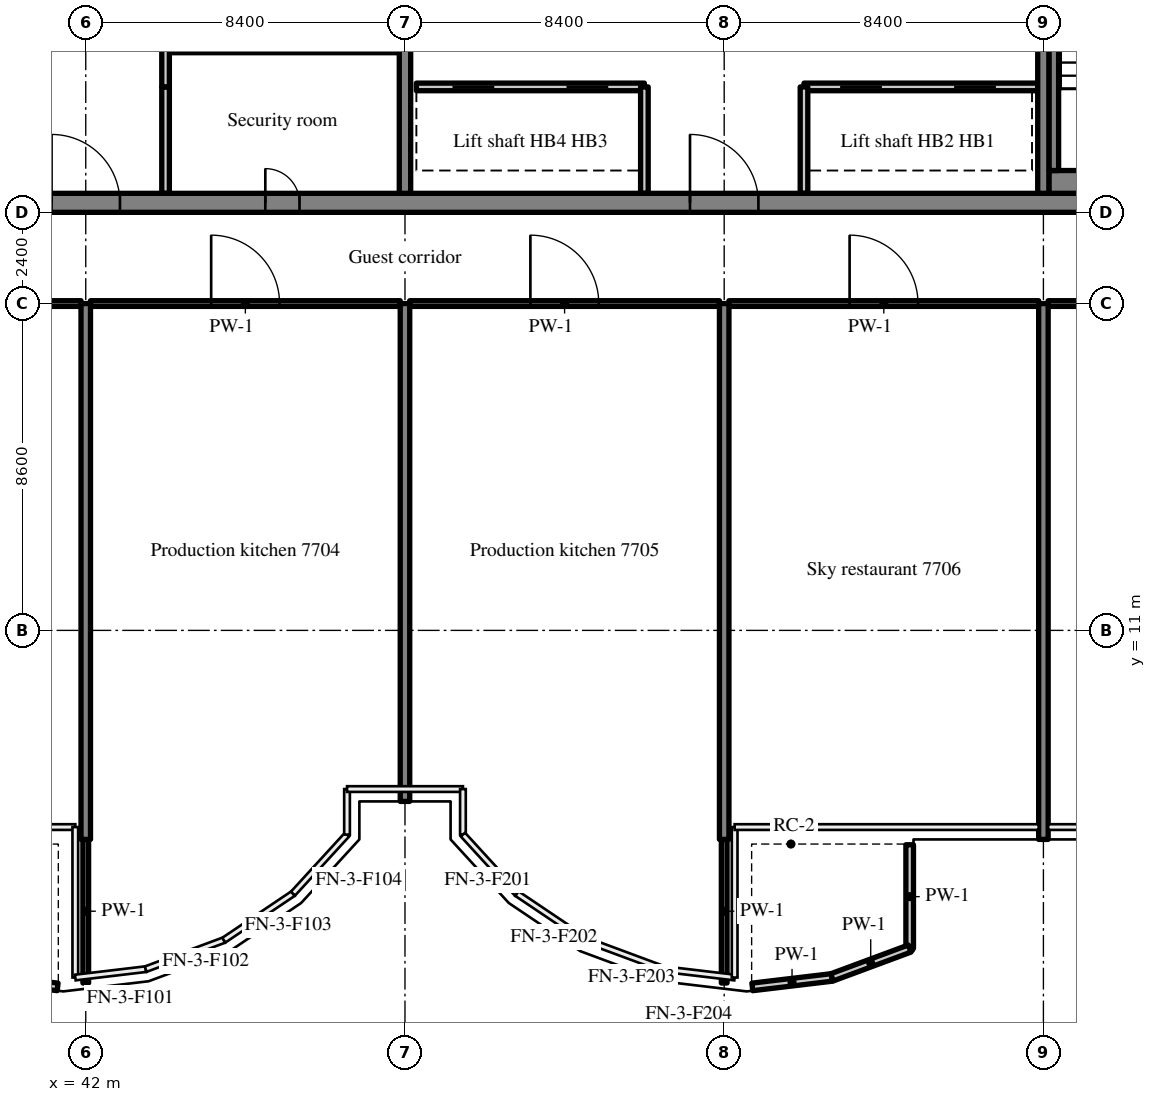
"""IFC4 building model, lengths in metres.
Left out: names, types, materials, properties, quantities, classifications, styles, units other than length and angle.
Written with IfcOpenShell. Run it as: python <this file> out.ifc"""

import sys

from ifc_helpers import new_model, si_unit, direction, frame, frame_2d, origin, place, context, subcontext, project, spatial, rectangle, extrude, source, transform, mapped, element, fill, save


model = new_model("IFC4")
c1 = context("Model", 3, precision=1e-05, world=origin(), true_north=direction((0.0, 1.0)))
c2 = subcontext(c1, "Body", "Model", "MODEL_VIEW")
j1 = project(units=[si_unit("LENGTHUNIT", "METRE"), si_unit("PLANEANGLEUNIT", "RADIAN")], contexts=[c1])
p1 = place(None, origin())
s1 = spatial("IfcSite", under=j1, at=p1, CompositionType="ELEMENT")
p2 = place(p1, origin())
s2 = spatial("IfcBuilding", under=s1, at=p2, CompositionType="ELEMENT")
p3 = place(p2, frame((0.0, 0.0, 323.7)))
s3 = spatial("IfcBuildingStorey", under=s2, at=p3, CompositionType="ELEMENT", Elevation=323.7)
m1 = source(origin(), c2, "Body", "SweptSolid", [
    extrude(rectangle(XDim=50.4, YDim=0.5, at=frame_2d((25.2, 0.0))), origin(), (0.0, 0.0, 1.0), 5.72),
])
p4 = place(p3, frame((25.2, 22.25, 0.0), z_axis=(0.0, 0.0, 1.0), x_axis=(1.0, 0.0, 0.0)))
e1 = element("IfcWall", 1, at=p4, inside=s3, PredefinedType="SHEAR", context=c2, shape_type="MappedRepresentation", body=[
    mapped(m1, transform((0.0, 0.0, 0.0), scale=1.0)),
])
m2 = source(origin(), c2, "Body", "SweptSolid", [
    extrude(rectangle(XDim=1.8, YDim=2.1, at=frame_2d((0.9, 1.05))), frame((0.0, 0.26, 0.0), z_axis=(0.0, -1.0, 0.0), x_axis=(1.0, 0.0, 0.0)), (0.0, 0.0, 1.0), 0.52),
])
p5 = place(p4, frame((15.9, 0.0, 0.0)))
e2 = element("IfcOpeningElement", 2, at=p5, cuts=e1, PredefinedType="OPENING", context=c2, shape_type="MappedRepresentation", body=[
    mapped(m2, transform((0.0, 0.0, 0.0), scale=1.0)),
])
m3 = source(origin(), c2, "Body", "SweptSolid", [
    extrude(rectangle(XDim=0.9, YDim=2.1, at=frame_2d((0.45, 1.05))), frame((0.0, 0.26, 0.0), z_axis=(0.0, -1.0, 0.0), x_axis=(1.0, 0.0, 0.0)), (0.0, 0.0, 1.0), 0.52),
])
p6 = place(p4, frame((9.675, 0.0, 0.0)))
e3 = element("IfcOpeningElement", 3, at=p6, cuts=e1, PredefinedType="OPENING", context=c2, shape_type="MappedRepresentation", body=[
    mapped(m3, transform((0.0, 0.0, 0.0), scale=1.0)),
])
p7 = place(p4, frame((21.525, 0.0, 0.0)))
e4 = element("IfcOpeningElement", 4, at=p7, cuts=e1, PredefinedType="OPENING", context=c2, shape_type="MappedRepresentation", body=[
    mapped(m3, transform((0.0, 0.0, 0.0), scale=1.0)),
])
p8 = place(p4, frame((32.7, 0.0, 0.0)))
e5 = element("IfcOpeningElement", 5, at=p8, cuts=e1, PredefinedType="OPENING", context=c2, shape_type="MappedRepresentation", body=[
    mapped(m2, transform((0.0, 0.0, 0.0), scale=1.0)),
])
m4 = source(origin(), c2, "Body", "SweptSolid", [
    extrude(rectangle(XDim=1.2, YDim=2.1, at=frame_2d((0.6, 1.05))), frame((0.0, 0.26, 0.0), z_axis=(0.0, -1.0, 0.0), x_axis=(1.0, 0.0, 0.0)), (0.0, 0.0, 1.0), 0.52),
])
p9 = place(p4, frame((6.5, 0.0, 0.0)))
e6 = element("IfcOpeningElement", 6, at=p9, cuts=e1, PredefinedType="OPENING", context=c2, shape_type="MappedRepresentation", body=[
    mapped(m4, transform((0.0, 0.0, 0.0), scale=1.0)),
])
p10 = place(p4, frame((47.975, 0.0, 0.0)))
e7 = element("IfcOpeningElement", 7, at=p10, cuts=e1, PredefinedType="OPENING", context=c2, shape_type="MappedRepresentation", body=[
    mapped(m4, transform((0.0, 0.0, 0.0), scale=1.0)),
])
m5 = source(origin(), c2, "Body", "SweptSolid", [
    extrude(rectangle(XDim=19.0, YDim=0.3, at=frame_2d((9.5, 0.0))), origin(), (0.0, 0.0, 1.0), 5.72),
])
p11 = place(p3, frame((50.4, 22.5, 0.0), z_axis=(0.0, 0.0, 1.0), x_axis=(0.0, 1.0, 0.0)))
e8 = element("IfcWall", 8, at=p11, inside=s3, PredefinedType="SHEAR", context=c2, shape_type="MappedRepresentation", body=[
    mapped(m5, transform((0.0, 0.0, 0.0), scale=1.0)),
])
m6 = source(origin(), c2, "Body", "SweptSolid", [
    extrude(rectangle(XDim=1.1, YDim=2.1, at=frame_2d((0.55, 1.05))), frame((0.0, 0.16, 0.0), z_axis=(0.0, -1.0, 0.0), x_axis=(1.0, 0.0, 0.0)), (0.0, 0.0, 1.0), 0.32),
])
p12 = place(p11, frame((12.95, 0.0, 0.0)))
e9 = element("IfcOpeningElement", 9, at=p12, cuts=e8, PredefinedType="OPENING", context=c2, shape_type="MappedRepresentation", body=[
    mapped(m6, transform((0.0, 0.0, 0.0), scale=1.0)),
])
p13 = place(p3, frame((67.2, 22.5, 0.0), z_axis=(0.0, 0.0, 1.0), x_axis=(0.0, 1.0, 0.0)))
e10 = element("IfcWall", 10, at=p13, inside=s3, PredefinedType="SHEAR", context=c2, shape_type="MappedRepresentation", body=[
    mapped(m5, transform((0.0, 0.0, 0.0), scale=1.0)),
])
m7 = source(origin(), c2, "Body", "SweptSolid", [
    extrude(rectangle(XDim=14.1, YDim=0.25, at=frame_2d((7.05, 0.0))), origin(), (0.0, 0.0, 1.0), 5.72),
])
p14 = place(p3, frame((42.0, 5.5, 0.0), z_axis=(0.0, 0.0, 1.0), x_axis=(0.0, 1.0, 0.0)))
e11 = element("IfcWall", 11, at=p14, inside=s3, PredefinedType="SHEAR", context=c2, shape_type="MappedRepresentation", body=[
    mapped(m7, transform((0.0, 0.0, 0.0), scale=1.0)),
])
m8 = source(origin(), c2, "Body", "SweptSolid", [
    extrude(rectangle(XDim=13.1, YDim=0.25, at=frame_2d((6.55, 0.0))), origin(), (0.0, 0.0, 1.0), 5.72),
])
p15 = place(p3, frame((50.4, 6.5, 0.0), z_axis=(0.0, 0.0, 1.0), x_axis=(0.0, 1.0, 0.0)))
e12 = element("IfcWall", 12, at=p15, inside=s3, PredefinedType="SHEAR", context=c2, shape_type="MappedRepresentation", body=[
    mapped(m8, transform((0.0, 0.0, 0.0), scale=1.0)),
])
for number, where, z_axis, x_axis in (
    (13, (58.8, 5.5, 0.0), (0.0, 0.0, 1.0), (0.0, 1.0, 0.0)),
    (14, (67.2, 5.5, 0.0), (0.0, 0.0, 1.0), (0.0, 1.0, 0.0)),
):
    element("IfcWall", number, at=place(p3, frame(where, z_axis=z_axis, x_axis=x_axis)), inside=s3, PredefinedType="SHEAR", context=c2, shape_type="MappedRepresentation", body=[
        mapped(m7, transform((0.0, 0.0, 0.0), scale=1.0)),
    ])
m9 = source(origin(), c2, "Body", "SweptSolid", [
    extrude(rectangle(XDim=2.105, YDim=0.2, at=frame_2d((1.052, 0.0))), origin(), (0.0, 0.0, 1.0), 1.1),
])
p16 = place(p3, frame((41.26, 1.619, -0.05), z_axis=(0.0, 0.0, 1.0), x_axis=(-0.992992163316, 0.118180216587, 0.0)))
e15 = element("IfcWall", 15, at=p16, inside=s3, PredefinedType="PARAPET", context=c2, shape_type="MappedRepresentation", body=[
    mapped(m9, transform((0.0, 0.0, 0.0), scale=1.0)),
])
m10 = source(origin(), c2, "Body", "SweptSolid", [
    extrude(rectangle(XDim=2.731, YDim=0.2, at=frame_2d((1.366, 0.0))), origin(), (0.0, 0.0, 1.0), 1.1),
])
p17 = place(p3, frame((63.681, 5.36, -0.05), z_axis=(0.0, 0.0, 1.0), x_axis=(0.0, -1.0, 0.0)))
e16 = element("IfcWall", 16, at=p17, inside=s3, PredefinedType="PARAPET", context=c2, shape_type="MappedRepresentation", body=[
    mapped(m10, transform((0.0, 0.0, 0.0), scale=1.0)),
])
m11 = source(origin(), c2, "Body", "SweptSolid", [
    extrude(rectangle(XDim=2.187, YDim=0.2, at=frame_2d((1.094, 0.0))), origin(), (0.0, 0.0, 1.0), 1.1),
])
p18 = place(p3, frame((63.681, 2.629, -0.05), z_axis=(0.0, 0.0, 1.0), x_axis=(-0.937557411476, -0.347830562467, 0.0)))
e17 = element("IfcWall", 17, at=p18, inside=s3, PredefinedType="PARAPET", context=c2, shape_type="MappedRepresentation", body=[
    mapped(m11, transform((0.0, 0.0, 0.0), scale=1.0)),
])
p19 = place(p3, frame((61.63, 1.868, -0.05), z_axis=(0.0, 0.0, 1.0), x_axis=(-0.992992163316, -0.118180216587, 0.0)))
e18 = element("IfcWall", 18, at=p19, inside=s3, PredefinedType="PARAPET", context=c2, shape_type="MappedRepresentation", body=[
    mapped(m9, transform((0.0, 0.0, 0.0), scale=1.0)),
])
m12 = source(origin(), c2, "Body", "SweptSolid", [
    extrude(rectangle(XDim=2.8, YDim=0.2, at=frame_2d((1.4, 0.0))), origin(), (0.0, 0.0, 1.0), 5.72),
])
p20 = place(p3, frame((44.1, 22.5, 0.0), z_axis=(0.0, 0.0, 1.0), x_axis=(0.0, 1.0, 0.0)))
e19 = element("IfcWall", 19, at=p20, inside=s3, PredefinedType="PARTITIONING", context=c2, shape_type="MappedRepresentation", body=[
    mapped(m12, transform((0.0, 0.0, 0.0), scale=1.0)),
])
m13 = source(origin(), c2, "Body", "SweptSolid", [
    extrude(rectangle(XDim=1.0, YDim=0.2, at=frame_2d((0.5, 0.0))), origin(), (0.0, 0.0, 1.0), 5.72),
])
p21 = place(p3, frame((44.1, 25.3, 0.0), z_axis=(0.0, 0.0, 1.0), x_axis=(0.0, 1.0, 0.0)))
e20 = element("IfcWall", 20, at=p21, inside=s3, PredefinedType="PARTITIONING", context=c2, shape_type="MappedRepresentation", body=[
    mapped(m13, transform((0.0, 0.0, 0.0), scale=1.0)),
])
m14 = source(origin(), c2, "Body", "SweptSolid", [
    extrude(rectangle(XDim=6.15, YDim=0.2, at=frame_2d((3.075, 0.0))), origin(), (0.0, 0.0, 1.0), 5.72),
])
p22 = place(p3, frame((67.05, 25.3, 0.0), z_axis=(0.0, 0.0, 1.0), x_axis=(-1.0, 0.0, 0.0)))
e21 = element("IfcWall", 21, at=p22, inside=s3, PredefinedType="SOLIDWALL", context=c2, shape_type="MappedRepresentation", body=[
    mapped(m14, transform((0.0, 0.0, 0.0), scale=1.0)),
])
m15 = source(origin(), c2, "Body", "SweptSolid", [
    extrude(rectangle(XDim=1.1, YDim=2.1, at=frame_2d((0.55, 1.05))), frame((0.0, 0.11, 0.0), z_axis=(0.0, -1.0, 0.0), x_axis=(1.0, 0.0, 0.0)), (0.0, 0.0, 1.0), 0.22),
])
p23 = place(p22, frame((1.1, 0.0, 0.0)))
e22 = element("IfcOpeningElement", 22, at=p23, cuts=e21, PredefinedType="OPENING", context=c2, shape_type="MappedRepresentation", body=[
    mapped(m15, transform((0.0, 0.0, 0.0), scale=1.0)),
])
p24 = place(p22, frame((4.1, 0.0, 0.0)))
e23 = element("IfcOpeningElement", 23, at=p24, cuts=e21, PredefinedType="OPENING", context=c2, shape_type="MappedRepresentation", body=[
    mapped(m15, transform((0.0, 0.0, 0.0), scale=1.0)),
])
m16 = source(origin(), c2, "Body", "SweptSolid", [
    extrude(rectangle(XDim=6.0, YDim=0.2, at=frame_2d((3.0, 0.0))), origin(), (0.0, 0.0, 1.0), 5.72),
])
p25 = place(p3, frame((56.7, 25.3, 0.0), z_axis=(0.0, 0.0, 1.0), x_axis=(-1.0, 0.0, 0.0)))
e24 = element("IfcWall", 24, at=p25, inside=s3, PredefinedType="SOLIDWALL", context=c2, shape_type="MappedRepresentation", body=[
    mapped(m16, transform((0.0, 0.0, 0.0), scale=1.0)),
])
p26 = place(p25, frame((0.95, 0.0, 0.0)))
e25 = element("IfcOpeningElement", 25, at=p26, cuts=e24, PredefinedType="OPENING", context=c2, shape_type="MappedRepresentation", body=[
    mapped(m15, transform((0.0, 0.0, 0.0), scale=1.0)),
])
p27 = place(p25, frame((3.95, 0.0, 0.0)))
e26 = element("IfcOpeningElement", 26, at=p27, cuts=e24, PredefinedType="OPENING", context=c2, shape_type="MappedRepresentation", body=[
    mapped(m15, transform((0.0, 0.0, 0.0), scale=1.0)),
])
for number, where, z_axis, x_axis in (
    (27, (60.9, 22.5, 0.0), (0.0, 0.0, 1.0), (0.0, 1.0, 0.0)),
    (28, (56.7, 22.5, 0.0), (0.0, 0.0, 1.0), (0.0, 1.0, 0.0)),
):
    element("IfcWall", number, at=place(p3, frame(where, z_axis=z_axis, x_axis=x_axis)), inside=s3, PredefinedType="SOLIDWALL", context=c2, shape_type="MappedRepresentation", body=[
        mapped(m12, transform((0.0, 0.0, 0.0), scale=1.0)),
    ])
m17 = source(origin(), c2, "Body", "SweptSolid", [
    extrude(rectangle(XDim=4.9, YDim=0.6, at=frame_2d((2.45, 0.0))), origin(), (0.0, 0.0, 1.0), 5.72),
])
p28 = place(p3, frame((67.35, 22.8, 0.0), z_axis=(0.0, 0.0, 1.0), x_axis=(1.0, 0.0, 0.0)))
e29 = element("IfcWall", 29, at=p28, inside=s3, PredefinedType="SOLIDWALL", context=c2, shape_type="MappedRepresentation", body=[
    mapped(m17, transform((0.0, 0.0, 0.0), scale=1.0)),
])
m18 = source(origin(), c2, "Body", "SweptSolid", [
    extrude(rectangle(XDim=8.1, YDim=0.25, at=frame_2d((4.05, 0.0))), origin(), (0.0, 0.0, 1.0), 5.72),
])
p29 = place(p3, frame((67.475, 23.1, 0.0), z_axis=(0.0, 0.0, 1.0), x_axis=(0.0, 1.0, 0.0)))
e30 = element("IfcWall", 30, at=p29, inside=s3, PredefinedType="SOLIDWALL", context=c2, shape_type="MappedRepresentation", body=[
    mapped(m18, transform((0.0, 0.0, 0.0), scale=1.0)),
])
m19 = source(origin(), c2, "Body", "SweptSolid", [
    extrude(rectangle(XDim=8.15, YDim=0.15, at=frame_2d((4.075, 0.0))), origin(), (0.0, 0.0, 1.0), 5.02),
])
p30 = place(p3, frame((33.725, 19.6, 0.0), z_axis=(0.0, 0.0, 1.0), x_axis=(1.0, 0.0, 0.0)))
e31 = element("IfcWall", 31, at=p30, inside=s3, PredefinedType="PARTITIONING", context=c2, shape_type="MappedRepresentation", body=[
    mapped(m19, transform((0.0, 0.0, 0.0), scale=1.0)),
])
m20 = source(origin(), c2, "Body", "SweptSolid", [
    extrude(rectangle(XDim=1.8, YDim=2.1, at=frame_2d((0.9, 1.05))), frame((0.0, 0.085, 0.0), z_axis=(0.0, -1.0, 0.0), x_axis=(1.0, 0.0, 0.0)), (0.0, 0.0, 1.0), 0.17),
])
p31 = place(p30, frame((3.175, 0.0, 0.0)))
e32 = element("IfcOpeningElement", 32, at=p31, cuts=e31, PredefinedType="OPENING", context=c2, shape_type="MappedRepresentation", body=[
    mapped(m20, transform((0.0, 0.0, 0.0), scale=1.0)),
])
p32 = place(p3, frame((42.125, 19.6, 0.0), z_axis=(0.0, 0.0, 1.0), x_axis=(1.0, 0.0, 0.0)))
e33 = element("IfcWall", 33, at=p32, inside=s3, PredefinedType="PARTITIONING", context=c2, shape_type="MappedRepresentation", body=[
    mapped(m19, transform((0.0, 0.0, 0.0), scale=1.0)),
])
p33 = place(p32, frame((3.175, 0.0, 0.0)))
e34 = element("IfcOpeningElement", 34, at=p33, cuts=e33, PredefinedType="OPENING", context=c2, shape_type="MappedRepresentation", body=[
    mapped(m20, transform((0.0, 0.0, 0.0), scale=1.0)),
])
m21 = source(origin(), c2, "Body", "SweptSolid", [
    extrude(rectangle(XDim=8.15, YDim=0.15, at=frame_2d((4.075, 0.0))), origin(), (0.0, 0.0, 1.0), 5.02),
])
p34 = place(p3, frame((50.525, 19.6, 0.0), z_axis=(0.0, 0.0, 1.0), x_axis=(1.0, 0.0, 0.0)))
e35 = element("IfcWall", 35, at=p34, inside=s3, PredefinedType="PARTITIONING", context=c2, shape_type="MappedRepresentation", body=[
    mapped(m21, transform((0.0, 0.0, 0.0), scale=1.0)),
])
p35 = place(p34, frame((3.175, 0.0, 0.0)))
e36 = element("IfcOpeningElement", 36, at=p35, cuts=e35, PredefinedType="OPENING", context=c2, shape_type="MappedRepresentation", body=[
    mapped(m20, transform((0.0, 0.0, 0.0), scale=1.0)),
])
p36 = place(p3, frame((58.925, 19.6, 0.0), z_axis=(0.0, 0.0, 1.0), x_axis=(1.0, 0.0, 0.0)))
e37 = element("IfcWall", 37, at=p36, inside=s3, PredefinedType="PARTITIONING", context=c2, shape_type="MappedRepresentation", body=[
    mapped(m19, transform((0.0, 0.0, 0.0), scale=1.0)),
])
p37 = place(p36, frame((3.175, 0.0, 0.0)))
e38 = element("IfcOpeningElement", 38, at=p37, cuts=e37, PredefinedType="OPENING", context=c2, shape_type="MappedRepresentation", body=[
    mapped(m20, transform((0.0, 0.0, 0.0), scale=1.0)),
])
p38 = place(p3, frame((67.325, 19.6, 0.0), z_axis=(0.0, 0.0, 1.0), x_axis=(1.0, 0.0, 0.0)))
e39 = element("IfcWall", 39, at=p38, inside=s3, PredefinedType="PARTITIONING", context=c2, shape_type="MappedRepresentation", body=[
    mapped(m21, transform((0.0, 0.0, 0.0), scale=1.0)),
])
p39 = place(p38, frame((3.175, 0.0, 0.0)))
e40 = element("IfcOpeningElement", 40, at=p39, cuts=e39, PredefinedType="OPENING", context=c2, shape_type="MappedRepresentation", body=[
    mapped(m20, transform((0.0, 0.0, 0.0), scale=1.0)),
])
m22 = source(origin(), c2, "Body", "SweptSolid", [
    extrude(rectangle(XDim=3.778, YDim=0.15, at=frame_2d((1.889, 0.0))), origin(), (0.0, 0.0, 1.0), 5.72),
])
for number, where, z_axis, x_axis in (
    (41, (42.0, 1.722, 0.0), (0.0, 0.0, 1.0), (0.0, 1.0, 0.0)),
    (42, (58.8, 1.722, 0.0), (0.0, 0.0, 1.0), (0.0, 1.0, 0.0)),
):
    element("IfcWall", number, at=place(p3, frame(where, z_axis=z_axis, x_axis=x_axis)), inside=s3, PredefinedType="PARTITIONING", context=c2, shape_type="MappedRepresentation", body=[
        mapped(m22, transform((0.0, 0.0, 0.0), scale=1.0)),
    ])
m23 = source(origin(), c2, "Body", "SweptSolid", [
    extrude(rectangle(XDim=1.8, YDim=2.1, at=frame_2d((0.9, 1.05))), frame((0.0, 0.175, 0.0), z_axis=(0.0, -1.0, 0.0), x_axis=(1.0, 0.0, 0.0)), (0.0, 0.0, 1.0), 0.05),
])
p40 = place(p5, origin())
e43 = element("IfcDoor", 43, at=p40, inside=s3, OperationType="DOUBLE_DOOR_SINGLE_SWING", PredefinedType="DOOR", context=c2, shape_type="MappedRepresentation", body=[
    mapped(m23, transform((0.0, 0.0, 0.0), scale=1.0)),
])
fill(e2, e43)
m24 = source(origin(), c2, "Body", "SweptSolid", [
    extrude(rectangle(XDim=0.9, YDim=2.1, at=frame_2d((0.45, 1.05))), frame((0.0, 0.175, 0.0), z_axis=(0.0, -1.0, 0.0), x_axis=(1.0, 0.0, 0.0)), (0.0, 0.0, 1.0), 0.05),
])
p41 = place(p7, origin())
e44 = element("IfcDoor", 44, at=p41, inside=s3, OperationType="SINGLE_SWING_LEFT", PredefinedType="DOOR", context=c2, shape_type="MappedRepresentation", body=[
    mapped(m24, transform((0.0, 0.0, 0.0), scale=1.0)),
])
fill(e4, e44)
p42 = place(p8, origin())
e45 = element("IfcDoor", 45, at=p42, inside=s3, OperationType="DOUBLE_DOOR_SINGLE_SWING", PredefinedType="DOOR", context=c2, shape_type="MappedRepresentation", body=[
    mapped(m23, transform((0.0, 0.0, 0.0), scale=1.0)),
])
fill(e5, e45)
m25 = source(origin(), c2, "Body", "SweptSolid", [
    extrude(rectangle(XDim=1.1, YDim=2.1, at=frame_2d((0.55, 1.05))), frame((0.0, 0.025, 0.0), z_axis=(0.0, -1.0, 0.0), x_axis=(1.0, 0.0, 0.0)), (0.0, 0.0, 1.0), 0.05),
])
p43 = place(p23, origin())
e46 = element("IfcDoor", 46, at=p43, inside=s3, OperationType="SLIDING_TO_RIGHT", PredefinedType="DOOR", context=c2, shape_type="MappedRepresentation", body=[
    mapped(m25, transform((0.0, 0.0, 0.0), scale=1.0)),
])
fill(e22, e46)
p44 = place(p24, origin())
e47 = element("IfcDoor", 47, at=p44, inside=s3, OperationType="SLIDING_TO_LEFT", PredefinedType="DOOR", context=c2, shape_type="MappedRepresentation", body=[
    mapped(m25, transform((0.0, 0.0, 0.0), scale=1.0)),
])
fill(e23, e47)
p45 = place(p26, origin())
e48 = element("IfcDoor", 48, at=p45, inside=s3, OperationType="SLIDING_TO_RIGHT", PredefinedType="DOOR", context=c2, shape_type="MappedRepresentation", body=[
    mapped(m25, transform((0.0, 0.0, 0.0), scale=1.0)),
])
fill(e25, e48)
p46 = place(p27, origin())
e49 = element("IfcDoor", 49, at=p46, inside=s3, OperationType="SLIDING_TO_LEFT", PredefinedType="DOOR", context=c2, shape_type="MappedRepresentation", body=[
    mapped(m25, transform((0.0, 0.0, 0.0), scale=1.0)),
])
fill(e26, e49)
m26 = source(origin(), c2, "Body", "SweptSolid", [
    extrude(rectangle(XDim=1.8, YDim=2.1, at=frame_2d((0.9, 1.05))), frame((0.0, 0.025, 0.0), z_axis=(0.0, -1.0, 0.0), x_axis=(1.0, 0.0, 0.0)), (0.0, 0.0, 1.0), 0.05),
])
p47 = place(p33, origin())
e50 = element("IfcDoor", 50, at=p47, inside=s3, OperationType="DOUBLE_DOOR_SINGLE_SWING", PredefinedType="DOOR", context=c2, shape_type="MappedRepresentation", body=[
    mapped(m26, transform((0.0, 0.0, 0.0), scale=1.0)),
])
fill(e34, e50)
p48 = place(p35, origin())
e51 = element("IfcDoor", 51, at=p48, inside=s3, OperationType="DOUBLE_DOOR_SINGLE_SWING", PredefinedType="DOOR", context=c2, shape_type="MappedRepresentation", body=[
    mapped(m26, transform((0.0, 0.0, 0.0), scale=1.0)),
])
fill(e36, e51)
p49 = place(p37, origin())
e52 = element("IfcDoor", 52, at=p49, inside=s3, OperationType="DOUBLE_DOOR_SINGLE_SWING", PredefinedType="DOOR", context=c2, shape_type="MappedRepresentation", body=[
    mapped(m26, transform((0.0, 0.0, 0.0), scale=1.0)),
])
fill(e38, e52)
save(model, sys.argv[1])
